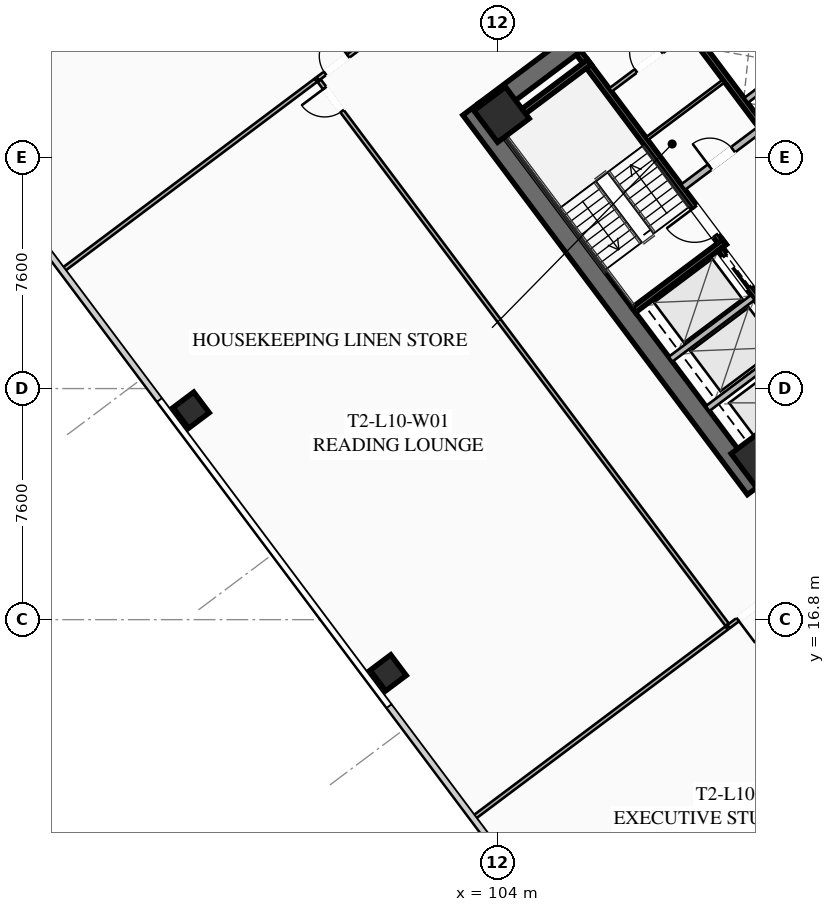
"""IFC4 building model, lengths in metres.
Left out: names, types, materials, properties, quantities, classifications, styles, units other than length and angle.
Written with IfcOpenShell. Run it as: python <this file> out.ifc"""

import sys

from ifc_helpers import new_model, si_unit, direction, frame, frame_2d, origin, origin_2d, place, context, subcontext, project, spatial, rectangle, hollow_rectangle, extrude, element, fill, save


model = new_model("IFC4")
c1 = context("Model", 3, precision=1e-05, world=origin(), true_north=direction((0.0, 1.0)))
c2 = subcontext(c1, "Body", "Model", "MODEL_VIEW")
j1 = project(units=[si_unit("LENGTHUNIT", "METRE"), si_unit("PLANEANGLEUNIT", "RADIAN")], contexts=[c1])
p1 = place(None, origin())
s1 = spatial("IfcSite", under=j1, at=p1, CompositionType="ELEMENT")
p2 = place(p1, origin())
s2 = spatial("IfcBuilding", under=s1, at=p2, CompositionType="ELEMENT")
p3 = place(p2, frame((0.0, 0.0, 42.35)))
s3 = spatial("IfcBuildingStorey", under=s2, at=p3, CompositionType="ELEMENT", Elevation=42.35)
p4 = place(p3, frame((112.476, 21.107, 0.0), z_axis=(0.0, 0.0, 1.0), x_axis=(-0.600005007985, 0.799996243986, 0.0)))
e1 = element("IfcWall", 1, at=p4, inside=s3, PredefinedType="SHEAR", context=c2, shape_type="SweptSolid", body=[
    extrude(rectangle(XDim=15.6, YDim=0.65, at=frame_2d((7.8, 0.0))), origin(), (0.0, 0.0, 1.0), 3.55),
])
p5 = place(p3, frame((124.429, 30.478, 0.0), z_axis=(0.0, 0.0, 1.0), x_axis=(-0.799998028465, -0.600002628705, 0.0)))
e2 = element("IfcWall", 2, at=p5, inside=s3, PredefinedType="SHEAR", context=c2, shape_type="SweptSolid", body=[
    extrude(rectangle(XDim=14.86, YDim=0.65, at=frame_2d((7.43, 0.0))), origin(), (0.0, 0.0, 1.0), 3.55),
])
p6 = place(p5, frame((9.13, 0.0, 0.0)))
e3 = element("IfcOpeningElement", 3, at=p6, cuts=e2, PredefinedType="OPENING", context=c2, shape_type="SweptSolid", body=[
    extrude(rectangle(XDim=1.25, YDim=2.25, at=frame_2d((0.625, 1.125))), frame((0.0, 0.335, 0.0), z_axis=(0.0, -1.0, 0.0), x_axis=(1.0, 0.0, 0.0)), (0.0, 0.0, 1.0), 0.67),
])
p7 = place(p5, frame((4.08, 0.0, 0.0)))
e4 = element("IfcOpeningElement", 4, at=p7, cuts=e2, PredefinedType="OPENING", context=c2, shape_type="SweptSolid", body=[
    extrude(rectangle(XDim=1.25, YDim=2.25, at=frame_2d((0.625, 1.125))), frame((0.0, 0.335, 0.0), z_axis=(0.0, -1.0, 0.0), x_axis=(1.0, 0.0, 0.0)), (0.0, 0.0, 1.0), 0.67),
])
p8 = place(p3, frame((103.571, 33.522, 0.0), z_axis=(0.0, 0.0, 1.0), x_axis=(0.799998028465, 0.600002628705, 0.0)))
e5 = element("IfcWall", 5, at=p8, inside=s3, PredefinedType="SHEAR", context=c2, shape_type="SweptSolid", body=[
    extrude(rectangle(XDim=14.86, YDim=0.65, at=frame_2d((7.43, 0.0))), origin(), (0.0, 0.0, 1.0), 3.55),
])
p9 = place(p8, frame((4.48, 0.0, 0.0)))
e6 = element("IfcOpeningElement", 6, at=p9, cuts=e5, PredefinedType="OPENING", context=c2, shape_type="SweptSolid", body=[
    extrude(rectangle(XDim=1.25, YDim=2.25, at=frame_2d((0.625, 1.125))), frame((0.0, 0.335, 0.0), z_axis=(0.0, -1.0, 0.0), x_axis=(1.0, 0.0, 0.0)), (0.0, 0.0, 1.0), 0.67),
])
p10 = place(p8, frame((9.53, 0.0, 0.0)))
e7 = element("IfcOpeningElement", 7, at=p10, cuts=e5, PredefinedType="OPENING", context=c2, shape_type="SweptSolid", body=[
    extrude(rectangle(XDim=1.25, YDim=2.25, at=frame_2d((0.625, 1.125))), frame((0.0, 0.335, 0.0), z_axis=(0.0, -1.0, 0.0), x_axis=(1.0, 0.0, 0.0)), (0.0, 0.0, 1.0), 0.67),
])
for number, where, z_axis, x_axis in (
    (8, (112.59, 22.13, 0.0), (0.0, 0.0, 1.0), (0.8, 0.6, 0.0)),
    (9, (104.13, 33.41, 0.0), (0.0, 0.0, 1.0), (0.8, 0.6, 0.0)),
):
    element("IfcColumn", number, at=place(p3, frame(where, z_axis=z_axis, x_axis=x_axis)), inside=s3, PredefinedType="COLUMN", context=c2, shape_type="SweptSolid", body=[
        extrude(hollow_rectangle(XDim=1.3, YDim=1.3, WallThickness=0.05, at=origin_2d()), origin(), (0.0, 0.0, 1.0), 3.35),
    ])
for number, where, z_axis, x_axis in (
    (10, (93.92, 23.69, 0.0), (0.0, 0.0, 1.0), (0.8, 0.6, 0.0)),
    (11, (100.4, 15.05, 0.0), (0.0, 0.0, 1.0), (0.8, 0.6, 0.0)),
):
    element("IfcColumn", number, at=place(p3, frame(where, z_axis=z_axis, x_axis=x_axis)), inside=s3, PredefinedType="COLUMN", context=c2, shape_type="SweptSolid", body=[
        extrude(hollow_rectangle(XDim=0.85, YDim=0.85, WallThickness=0.035, at=origin_2d()), origin(), (0.0, 0.0, 1.0), 3.35),
    ])
p11 = place(p3, frame((111.44, 29.08, 0.0), z_axis=(0.0, 0.0, 1.0), x_axis=(-0.600009827119, 0.799992629566, 0.0)))
e12 = element("IfcWall", 12, at=p11, inside=s3, PredefinedType="SHEAR", context=c2, shape_type="SweptSolid", body=[
    extrude(rectangle(XDim=7.95, YDim=0.2, at=frame_2d((3.975, 0.0))), origin(), (0.0, 0.0, 1.0), 3.35),
])
p12 = place(p11, frame((0.45, 0.0, 0.0)))
e13 = element("IfcOpeningElement", 13, at=p12, cuts=e12, PredefinedType="OPENING", context=c2, shape_type="SweptSolid", body=[
    extrude(rectangle(XDim=1.15, YDim=2.2, at=frame_2d((0.575, 1.1))), frame((0.0, 0.11, 0.0), z_axis=(0.0, -1.0, 0.0), x_axis=(1.0, 0.0, 0.0)), (0.0, 0.0, 1.0), 0.22),
])
for number, where, z_axis, x_axis in (
    (14, (108.476, 26.982, 0.0), (0.0, 0.0, 1.0), (0.8, 0.6, 0.0)),
    (15, (104.036, 32.902, 0.0), (0.0, 0.0, 1.0), (0.8, 0.6, 0.0)),
):
    element("IfcWall", number, at=place(p3, frame(where, z_axis=z_axis, x_axis=x_axis)), inside=s3, PredefinedType="SHEAR", context=c2, shape_type="SweptSolid", body=[
        extrude(rectangle(XDim=3.73, YDim=0.2, at=frame_2d((1.865, 0.0))), origin(), (0.0, 0.0, 1.0), 3.35),
    ])
p13 = place(p3, frame((117.938, 26.016, 0.0), z_axis=(0.0, 0.0, 1.0), x_axis=(-0.600005463273, 0.799995902516, 0.0)))
e16 = element("IfcWall", 16, at=p13, inside=s3, PredefinedType="SHEAR", context=c2, shape_type="SweptSolid", body=[
    extrude(rectangle(XDim=14.3, YDim=0.2, at=frame_2d((7.15, 0.0))), origin(), (0.0, 0.0, 1.0), 3.35),
])
p14 = place(p3, frame((110.104, 31.028, 0.0), z_axis=(0.0, 0.0, 1.0), x_axis=(0.800018601094, 0.59997519774, 0.0)))
e17 = element("IfcWall", 17, at=p14, inside=s3, PredefinedType="SOLIDWALL", context=c2, shape_type="SweptSolid", body=[
    extrude(rectangle(XDim=3.15, YDim=0.22, at=frame_2d((1.575, 0.0))), origin(), (0.0, 0.0, 1.0), 2.703),
])
p15 = place(p14, frame((1.1, 0.0, 0.0)))
e18 = element("IfcOpeningElement", 18, at=p15, cuts=e17, PredefinedType="OPENING", context=c2, shape_type="SweptSolid", body=[
    extrude(rectangle(XDim=0.95, YDim=2.05, at=frame_2d((0.475, 1.025))), frame((0.0, 0.12, 0.0), z_axis=(0.0, -1.0, 0.0), x_axis=(1.0, 0.0, 0.0)), (0.0, 0.0, 1.0), 0.24),
])
p16 = place(p3, frame((115.13, 23.91, 0.0), z_axis=(0.0, 0.0, 1.0), x_axis=(-0.599975393228, 0.800018454488, 0.0)))
e19 = element("IfcWall", 19, at=p16, inside=s3, PredefinedType="SHEAR", context=c2, shape_type="SweptSolid", body=[
    extrude(rectangle(XDim=6.35, YDim=0.2, at=frame_2d((3.175, 0.0))), origin(), (0.0, 0.0, 1.0), 3.35),
])
p17 = place(p16, frame((4.775, 0.0, 0.0)))
e20 = element("IfcOpeningElement", 20, at=p17, cuts=e19, PredefinedType="OPENING", context=c2, shape_type="SweptSolid", body=[
    extrude(rectangle(XDim=1.3, YDim=2.25, at=frame_2d((0.65, 1.125))), frame((0.0, 0.11, 0.0), z_axis=(0.0, -1.0, 0.0), x_axis=(1.0, 0.0, 0.0)), (0.0, 0.0, 1.0), 0.22),
])
p18 = place(p16, frame((2.775, 0.0, 0.0)))
e21 = element("IfcOpeningElement", 21, at=p18, cuts=e19, PredefinedType="OPENING", context=c2, shape_type="SweptSolid", body=[
    extrude(rectangle(XDim=1.3, YDim=2.25, at=frame_2d((0.65, 1.125))), frame((0.0, 0.11, 0.0), z_axis=(0.0, -1.0, 0.0), x_axis=(1.0, 0.0, 0.0)), (0.0, 0.0, 1.0), 0.22),
])
p19 = place(p16, frame((0.575, 0.0, 0.0)))
e22 = element("IfcOpeningElement", 22, at=p19, cuts=e19, PredefinedType="OPENING", context=c2, shape_type="SweptSolid", body=[
    extrude(rectangle(XDim=1.3, YDim=2.25, at=frame_2d((0.65, 1.125))), frame((0.0, 0.11, 0.0), z_axis=(0.0, -1.0, 0.0), x_axis=(1.0, 0.0, 0.0)), (0.0, 0.0, 1.0), 0.22),
])
for number, where, z_axis, x_axis in (
    (23, (110.906, 23.742, 0.0), (0.0, 0.0, 1.0), (0.8, 0.6, 0.0)),
    (24, (109.688, 25.366, 0.0), (0.0, 0.0, 1.0), (0.8, 0.6, 0.0)),
):
    element("IfcWall", number, at=place(p3, frame(where, z_axis=z_axis, x_axis=x_axis)), inside=s3, PredefinedType="SOLIDWALL", context=c2, shape_type="SweptSolid", body=[
        extrude(rectangle(XDim=3.38, YDim=0.2, at=frame_2d((1.69, 0.0))), origin(), (0.0, 0.0, 1.0), 3.35),
    ])
p20 = place(p3, frame((107.71, 34.22, 0.0), z_axis=(0.0, 0.0, 1.0), x_axis=(0.799981399002, 0.60002480053, 0.0)))
e25 = element("IfcWall", 25, at=p20, inside=s3, PredefinedType="PARTITIONING", context=c2, shape_type="SweptSolid", body=[
    extrude(rectangle(XDim=3.15, YDim=0.135, at=frame_2d((1.575, 0.0))), origin(), (0.0, 0.0, 1.0), 2.703),
])
p21 = place(p20, frame((1.05, 0.0, 0.0)))
e26 = element("IfcOpeningElement", 26, at=p21, cuts=e25, PredefinedType="OPENING", context=c2, shape_type="SweptSolid", body=[
    extrude(rectangle(XDim=1.05, YDim=2.2, at=frame_2d((0.525, 1.1))), frame((0.0, 0.077, 0.0), z_axis=(0.0, -1.0, 0.0), x_axis=(1.0, 0.0, 0.0)), (0.0, 0.0, 1.0), 0.155),
])
p22 = place(p3, frame((108.91, 32.62, 0.0), z_axis=(0.0, 0.0, 1.0), x_axis=(0.800018601094, 0.59997519774, 0.0)))
e27 = element("IfcWall", 27, at=p22, inside=s3, PredefinedType="PARTITIONING", context=c2, shape_type="SweptSolid", body=[
    extrude(rectangle(XDim=3.15, YDim=0.11, at=frame_2d((1.575, 0.0))), origin(), (0.0, 0.0, 1.0), 2.703),
])
p23 = place(p3, frame((115.11, 33.27, 0.0), z_axis=(0.0, 0.0, 1.0), x_axis=(-0.600011488909, 0.79999138319, 0.0)))
e28 = element("IfcWall", 28, at=p23, inside=s3, PredefinedType="SOLIDWALL", context=c2, shape_type="SweptSolid", body=[
    extrude(rectangle(XDim=6.8, YDim=0.2, at=frame_2d((3.4, 0.0))), origin(), (0.0, 0.0, 1.0), 3.35),
])
p24 = place(p3, frame((112.176, 33.882, 0.0), z_axis=(0.0, 0.0, 1.0), x_axis=(0.8, 0.6, 0.0)))
e29 = element("IfcWall", 29, at=p24, inside=s3, PredefinedType="SOLIDWALL", context=c2, shape_type="SweptSolid", body=[
    extrude(rectangle(XDim=1.88, YDim=0.2, at=frame_2d((0.94, 0.0))), origin(), (0.0, 0.0, 1.0), 3.35),
])
p25 = place(p3, frame((98.084, 34.588, 0.0), z_axis=(0.0, 0.0, 1.0), x_axis=(0.799997053619, 0.600003928488, 0.0)))
e30 = element("IfcWall", 30, at=p25, inside=s3, PredefinedType="PARTITIONING", context=c2, shape_type="SweptSolid", body=[
    extrude(rectangle(XDim=29.83, YDim=0.135, at=frame_2d((14.915, 0.0))), origin(), (0.0, 0.0, 1.0), 2.703),
])
p26 = place(p25, frame((0.3, 0.0, 0.0)))
e31 = element("IfcOpeningElement", 31, at=p26, cuts=e30, PredefinedType="OPENING", context=c2, shape_type="SweptSolid", body=[
    extrude(rectangle(XDim=0.95, YDim=2.05, at=frame_2d((0.475, 1.025))), frame((0.0, 0.077, 0.0), z_axis=(0.0, -1.0, 0.0), x_axis=(1.0, 0.0, 0.0)), (0.0, 0.0, 1.0), 0.155),
])
p27 = place(p25, frame((28.58, 0.0, 0.0)))
e32 = element("IfcOpeningElement", 32, at=p27, cuts=e30, PredefinedType="OPENING", context=c2, shape_type="SweptSolid", body=[
    extrude(rectangle(XDim=0.95, YDim=2.05, at=frame_2d((0.475, 1.025))), frame((0.0, 0.077, 0.0), z_axis=(0.0, -1.0, 0.0), x_axis=(1.0, 0.0, 0.0)), (0.0, 0.0, 1.0), 0.155),
])
p28 = place(p3, frame((135.46, 34.47, 0.0), z_axis=(0.0, 0.0, 1.0), x_axis=(-0.800000982127, -0.599998690494, 0.0)))
e33 = element("IfcWall", 33, at=p28, inside=s3, PredefinedType="PARTITIONING", context=c2, shape_type="SweptSolid", body=[
    extrude(rectangle(XDim=29.83, YDim=0.135, at=frame_2d((14.915, 0.0))), origin(), (0.0, 0.0, 1.0), 2.703),
])
p29 = place(p28, frame((28.5, 0.0, 0.0)))
e34 = element("IfcOpeningElement", 34, at=p29, cuts=e33, PredefinedType="OPENING", context=c2, shape_type="SweptSolid", body=[
    extrude(rectangle(XDim=0.95, YDim=2.05, at=frame_2d((0.475, 1.025))), frame((0.0, 0.077, 0.0), z_axis=(0.0, -1.0, 0.0), x_axis=(1.0, 0.0, 0.0)), (0.0, 0.0, 1.0), 0.155),
])
p30 = place(p28, frame((17.901, 0.0, 0.0)))
e35 = element("IfcOpeningElement", 35, at=p30, cuts=e33, PredefinedType="OPENING", context=c2, shape_type="SweptSolid", body=[
    extrude(rectangle(XDim=0.95, YDim=2.05, at=frame_2d((0.475, 1.025))), frame((0.0, 0.077, 0.0), z_axis=(0.0, -1.0, 0.0), x_axis=(1.0, 0.0, 0.0)), (0.0, 0.0, 1.0), 0.155),
])
p31 = place(p28, frame((13.92, 0.0, 0.0)))
e36 = element("IfcOpeningElement", 36, at=p31, cuts=e33, PredefinedType="OPENING", context=c2, shape_type="SweptSolid", body=[
    extrude(rectangle(XDim=0.95, YDim=2.05, at=frame_2d((0.475, 1.025))), frame((0.0, 0.077, 0.0), z_axis=(0.0, -1.0, 0.0), x_axis=(1.0, 0.0, 0.0)), (0.0, 0.0, 1.0), 0.155),
])
p32 = place(p28, frame((0.38, 0.0, 0.0)))
e37 = element("IfcOpeningElement", 37, at=p32, cuts=e33, PredefinedType="OPENING", context=c2, shape_type="SweptSolid", body=[
    extrude(rectangle(XDim=0.95, YDim=2.05, at=frame_2d((0.475, 1.025))), frame((0.0, 0.077, 0.0), z_axis=(0.0, -1.0, 0.0), x_axis=(1.0, 0.0, 0.0)), (0.0, 0.0, 1.0), 0.155),
])
p33 = place(p3, frame((111.548, 16.636, 0.0), z_axis=(0.0, 0.0, 1.0), x_axis=(-0.600001746983, 0.79999868976, 0.0)))
e38 = element("IfcWall", 38, at=p33, inside=s3, PredefinedType="PARTITIONING", context=c2, shape_type="SweptSolid", body=[
    extrude(rectangle(XDim=22.36, YDim=0.135, at=frame_2d((11.18, 0.0))), origin(), (0.0, 0.0, 1.0), 2.703),
])
p34 = place(p33, frame((21.11, 0.0, 0.0)))
e39 = element("IfcOpeningElement", 39, at=p34, cuts=e38, PredefinedType="OPENING", context=c2, shape_type="SweptSolid", body=[
    extrude(rectangle(XDim=0.95, YDim=2.05, at=frame_2d((0.475, 1.025))), frame((0.0, 0.077, 0.0), z_axis=(0.0, -1.0, 0.0), x_axis=(1.0, 0.0, 0.0)), (0.0, 0.0, 1.0), 0.155),
])
for number, where, z_axis, x_axis in (
    (40, (98.02, 34.54, 0.0), (0.0, 0.0, 1.0), (-0.8, -0.6, 0.0)),
    (41, (103.196, 10.272, 0.0), (0.0, 0.0, 1.0), (0.8, 0.6, 0.0)),
):
    element("IfcWall", number, at=place(p3, frame(where, z_axis=z_axis, x_axis=x_axis)), inside=s3, PredefinedType="PARTITIONING", context=c2, shape_type="SweptSolid", body=[
        extrude(rectangle(XDim=10.42, YDim=0.135, at=frame_2d((5.21, 0.0))), origin(), (0.0, 0.0, 1.0), 2.703),
    ])
p35 = place(p12, origin())
e42 = element("IfcDoor", 42, at=p35, inside=s3, OperationType="SINGLE_SWING_RIGHT", PredefinedType="DOOR", context=c2, shape_type="SweptSolid", body=[
    extrude(rectangle(XDim=1.15, YDim=2.2, at=frame_2d((0.575, 1.1))), frame((0.0, 0.025, 0.0), z_axis=(0.0, -1.0, 0.0), x_axis=(1.0, 0.0, 0.0)), (0.0, 0.0, 1.0), 0.05),
])
fill(e13, e42)
p36 = place(p21, origin())
e43 = element("IfcDoor", 43, at=p36, inside=s3, OperationType="SINGLE_SWING_RIGHT", PredefinedType="DOOR", context=c2, shape_type="SweptSolid", body=[
    extrude(rectangle(XDim=1.05, YDim=2.2, at=frame_2d((0.525, 1.1))), frame((0.0, 0.025, 0.0), z_axis=(0.0, -1.0, 0.0), x_axis=(1.0, 0.0, 0.0)), (0.0, 0.0, 1.0), 0.05),
])
fill(e26, e43)
p37 = place(p15, origin())
e44 = element("IfcDoor", 44, at=p37, inside=s3, OperationType="SINGLE_SWING_LEFT", PredefinedType="DOOR", context=c2, shape_type="SweptSolid", body=[
    extrude(rectangle(XDim=0.95, YDim=2.05, at=frame_2d((0.475, 1.025))), frame((0.0, 0.025, 0.0), z_axis=(0.0, -1.0, 0.0), x_axis=(1.0, 0.0, 0.0)), (0.0, 0.0, 1.0), 0.05),
])
fill(e18, e44)
p38 = place(p26, origin())
e45 = element("IfcDoor", 45, at=p38, inside=s3, OperationType="SINGLE_SWING_RIGHT", PredefinedType="DOOR", context=c2, shape_type="SweptSolid", body=[
    extrude(rectangle(XDim=0.95, YDim=2.05, at=frame_2d((0.475, 1.025))), frame((0.0, 0.025, 0.0), z_axis=(0.0, -1.0, 0.0), x_axis=(1.0, 0.0, 0.0)), (0.0, 0.0, 1.0), 0.05),
])
fill(e31, e45)
p39 = place(p29, origin())
e46 = element("IfcDoor", 46, at=p39, inside=s3, OperationType="SINGLE_SWING_RIGHT", PredefinedType="DOOR", context=c2, shape_type="SweptSolid", body=[
    extrude(rectangle(XDim=0.95, YDim=2.05, at=frame_2d((0.475, 1.025))), frame((0.0, 0.025, 0.0), z_axis=(0.0, -1.0, 0.0), x_axis=(1.0, 0.0, 0.0)), (0.0, 0.0, 1.0), 0.05),
])
fill(e34, e46)
p40 = place(p34, origin())
e47 = element("IfcDoor", 47, at=p40, inside=s3, OperationType="SINGLE_SWING_RIGHT", PredefinedType="DOOR", context=c2, shape_type="SweptSolid", body=[
    extrude(rectangle(XDim=0.95, YDim=2.05, at=frame_2d((0.475, 1.025))), frame((0.0, 0.025, 0.0), z_axis=(0.0, -1.0, 0.0), x_axis=(1.0, 0.0, 0.0)), (0.0, 0.0, 1.0), 0.05),
])
fill(e39, e47)
p41 = place(p17, origin())
e48 = element("IfcDoor", 48, at=p41, inside=s3, OperationType="SLIDING_TO_LEFT", PredefinedType="DOOR", context=c2, shape_type="SweptSolid", body=[
    extrude(rectangle(XDim=1.3, YDim=2.25, at=frame_2d((0.65, 1.125))), frame((0.0, 0.025, 0.0), z_axis=(0.0, -1.0, 0.0), x_axis=(1.0, 0.0, 0.0)), (0.0, 0.0, 1.0), 0.05),
])
fill(e20, e48)
save(model, sys.argv[1])
